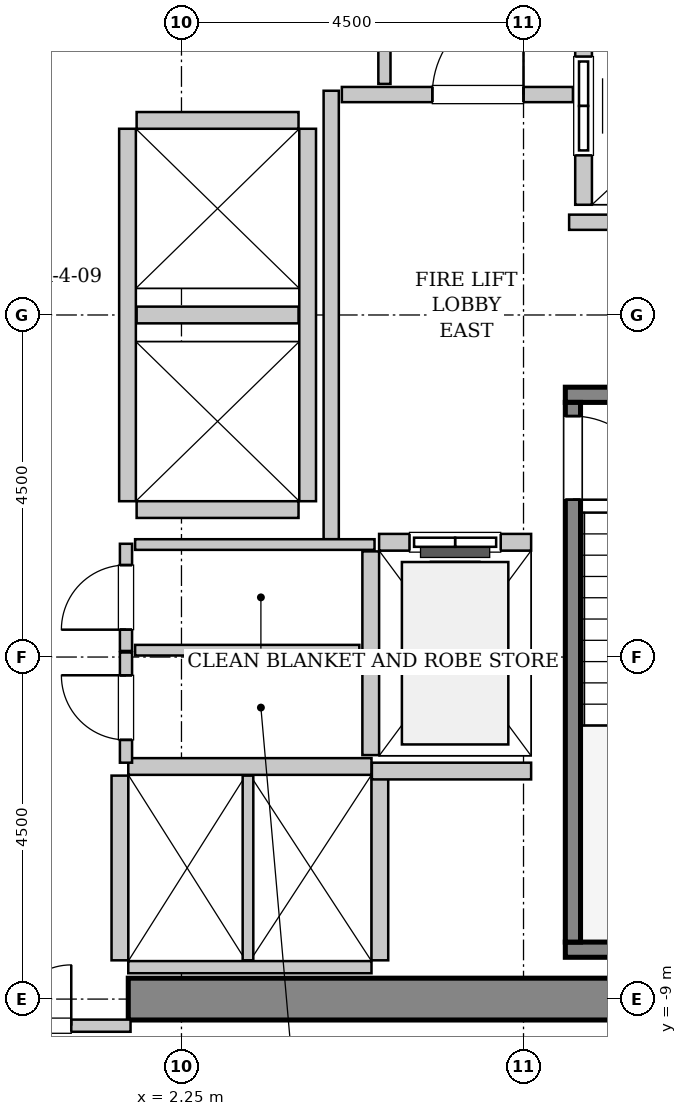
"""IFC4 building model, lengths in metres.
Left out: names, types, materials, properties, quantities, classifications, styles, units other than length and angle.
Written with IfcOpenShell. Run it as: python <this file> out.ifc"""

import sys

from ifc_helpers import new_model, si_unit, direction, frame, frame_2d, origin, place, context, subcontext, project, spatial, rectangle, extrude, source, transform, mapped, element, fill, save


model = new_model("IFC4")
c1 = context("Model", 3, precision=1e-05, world=origin(), true_north=direction((0.0, 1.0)))
c2 = subcontext(c1, "Body", "Model", "MODEL_VIEW")
j1 = project(units=[si_unit("LENGTHUNIT", "METRE"), si_unit("PLANEANGLEUNIT", "RADIAN")], contexts=[c1])
p1 = place(None, origin())
s1 = spatial("IfcSite", under=j1, at=p1, CompositionType="ELEMENT")
p2 = place(p1, origin())
s2 = spatial("IfcBuilding", under=s1, at=p2, CompositionType="ELEMENT")
p3 = place(p2, frame((0.0, 0.0, 90.8)))
s3 = spatial("IfcBuildingStorey", under=s2, at=p3, CompositionType="ELEMENT", Elevation=90.8)
m1 = source(origin(), c2, "Body", "SweptSolid", [
    extrude(rectangle(XDim=9.975, YDim=0.55, at=frame_2d((4.987, 0.0))), origin(), (0.0, 0.0, 1.0), 3.8),
])
p4 = place(p3, frame((1.55, -9.0, 0.0), z_axis=(0.0, 0.0, 1.0), x_axis=(1.0, 0.0, 0.0)))
e1 = element("IfcWall", 1, at=p4, inside=s3, PredefinedType="SHEAR", context=c2, shape_type="MappedRepresentation", body=[
    mapped(m1, transform((0.0, 0.0, 0.0), x_axis=(1.0, 0.0, 0.0), y_axis=(0.0, 1.0, 0.0), z_axis=(0.0, 0.0, 1.0), scale=1.0)),
])
m2 = source(origin(), c2, "Body", "SweptSolid", [
    extrude(rectangle(XDim=3.4, YDim=0.2, at=frame_2d((1.7, 0.0))), origin(), (0.0, 0.0, 1.0), 3.8),
])
p5 = place(p3, frame((7.3, -1.05, 0.0), z_axis=(0.0, 0.0, 1.0), x_axis=(1.0, 0.0, 0.0)))
e2 = element("IfcWall", 2, at=p5, inside=s3, PredefinedType="SOLIDWALL", context=c2, shape_type="MappedRepresentation", body=[
    mapped(m2, transform((0.0, 0.0, 0.0), x_axis=(1.0, 0.0, 0.0), y_axis=(0.0, 1.0, 0.0), z_axis=(0.0, 0.0, 1.0), scale=1.0)),
])
m3 = source(origin(), c2, "Body", "SweptSolid", [
    extrude(rectangle(XDim=3.68, YDim=0.2, at=frame_2d((1.84, 0.0))), origin(), (0.0, 0.0, 1.0), 3.8),
])
p6 = place(p3, frame((7.3, -8.35, 0.0), z_axis=(0.0, 0.0, 1.0), x_axis=(1.0, 0.0, 0.0)))
e3 = element("IfcWall", 3, at=p6, inside=s3, PredefinedType="SOLIDWALL", context=c2, shape_type="MappedRepresentation", body=[
    mapped(m3, transform((0.0, 0.0, 0.0), x_axis=(1.0, 0.0, 0.0), y_axis=(0.0, 1.0, 0.0), z_axis=(0.0, 0.0, 1.0), scale=1.0)),
])
m4 = source(origin(), c2, "Body", "SweptSolid", [
    extrude(rectangle(XDim=7.1, YDim=0.2, at=frame_2d((3.55, 0.0))), origin(), (0.0, 0.0, 1.0), 3.8),
])
p7 = place(p3, frame((7.4, -1.15, 0.0), z_axis=(0.0, 0.0, 1.0), x_axis=(0.0, -1.0, 0.0)))
e4 = element("IfcWall", 4, at=p7, inside=s3, PredefinedType="SOLIDWALL", context=c2, shape_type="MappedRepresentation", body=[
    mapped(m4, transform((0.0, 0.0, 0.0), x_axis=(1.0, 0.0, 0.0), y_axis=(0.0, 1.0, 0.0), z_axis=(0.0, 0.0, 1.0), scale=1.0)),
])
p8 = place(p7, frame((0.18, 0.0, 0.0)))
e5 = element("IfcOpeningElement", 5, at=p8, cuts=e4, PredefinedType="OPENING", context=c2, shape_type="SweptSolid", body=[
    extrude(rectangle(XDim=1.1, YDim=2.15, at=frame_2d((0.55, 1.075))), frame((0.0, 0.11, 0.0), z_axis=(0.0, -1.0, 0.0), x_axis=(1.0, 0.0, 0.0)), (0.0, 0.0, 1.0), 0.22),
])
m5 = source(origin(), c2, "Body", "SweptSolid", [
    extrude(rectangle(XDim=2.0, YDim=0.22, at=frame_2d((1.0, 0.0))), origin(), (0.0, 0.0, 1.0), 3.535),
])
p9 = place(p3, frame((6.85, -2.99, 0.0), z_axis=(0.0, 0.0, 1.0), x_axis=(-1.0, 0.0, 0.0)))
e6 = element("IfcWall", 6, at=p9, inside=s3, PredefinedType="SOLIDWALL", context=c2, shape_type="MappedRepresentation", body=[
    mapped(m5, transform((0.0, 0.0, 0.0), x_axis=(1.0, 0.0, 0.0), y_axis=(0.0, 1.0, 0.0), z_axis=(0.0, 0.0, 1.0), scale=1.0)),
])
p10 = place(p9, frame((0.4, 0.0, 0.0)))
e7 = element("IfcOpeningElement", 7, at=p10, cuts=e6, PredefinedType="OPENING", context=c2, shape_type="SweptSolid", body=[
    extrude(rectangle(XDim=1.2, YDim=2.2, at=frame_2d((0.6, 1.1))), frame((0.0, 0.12, 0.0), z_axis=(0.0, -1.0, 0.0), x_axis=(1.0, 0.0, 0.0)), (0.0, 0.0, 1.0), 0.24),
])
m6 = source(origin(), c2, "Body", "SweptSolid", [
    extrude(rectangle(XDim=2.68, YDim=0.22, at=frame_2d((1.34, 0.0))), origin(), (0.0, 0.0, 1.0), 3.535),
])
p11 = place(p3, frame((4.74, -3.11, 0.0), z_axis=(0.0, 0.0, 1.0), x_axis=(0.0, -1.0, 0.0)))
e8 = element("IfcWall", 8, at=p11, inside=s3, PredefinedType="SOLIDWALL", context=c2, shape_type="MappedRepresentation", body=[
    mapped(m6, transform((0.0, 0.0, 0.0), x_axis=(1.0, 0.0, 0.0), y_axis=(0.0, 1.0, 0.0), z_axis=(0.0, 0.0, 1.0), scale=1.0)),
])
m7 = source(origin(), c2, "Body", "SweptSolid", [
    extrude(rectangle(XDim=5.45, YDim=0.22, at=frame_2d((2.725, 0.0))), origin(), (0.0, 0.0, 1.0), 3.535),
])
p12 = place(p3, frame((7.54, 6.9, 0.0), z_axis=(0.0, 0.0, 1.0), x_axis=(0.0, -1.0, 0.0)))
e9 = element("IfcWall", 9, at=p12, inside=s3, PredefinedType="SOLIDWALL", context=c2, shape_type="MappedRepresentation", body=[
    mapped(m7, transform((0.0, 0.0, 0.0), x_axis=(1.0, 0.0, 0.0), y_axis=(0.0, 1.0, 0.0), z_axis=(0.0, 0.0, 1.0), scale=1.0)),
])
p13 = place(p12, frame((3.5, 0.0, 0.0)))
e10 = element("IfcOpeningElement", 10, at=p13, cuts=e9, PredefinedType="OPENING", context=c2, shape_type="SweptSolid", body=[
    extrude(rectangle(XDim=1.3, YDim=2.3, at=frame_2d((0.65, 1.15))), frame((0.0, 0.12, 0.0), z_axis=(0.0, -1.0, 0.0), x_axis=(1.0, 0.0, 0.0)), (0.0, 0.0, 1.0), 0.24),
])
p14 = place(p12, frame((0.65, 0.0, 0.0)))
e11 = element("IfcOpeningElement", 11, at=p14, cuts=e9, PredefinedType="OPENING", context=c2, shape_type="SweptSolid", body=[
    extrude(rectangle(XDim=1.3, YDim=2.3, at=frame_2d((0.65, 1.15))), frame((0.0, 0.12, 0.0), z_axis=(0.0, -1.0, 0.0), x_axis=(1.0, 0.0, 0.0)), (0.0, 0.0, 1.0), 0.24),
])
m8 = source(origin(), c2, "Body", "SweptSolid", [
    extrude(rectangle(XDim=3.2, YDim=0.22, at=frame_2d((1.6, 0.0))), origin(), (0.0, 0.0, 1.0), 3.535),
])
p15 = place(p3, frame((4.75, -5.94, 0.0), z_axis=(0.0, 0.0, 1.0), x_axis=(-1.0, 0.0, 0.0)))
e12 = element("IfcWall", 12, at=p15, inside=s3, PredefinedType="SOLIDWALL", context=c2, shape_type="MappedRepresentation", body=[
    mapped(m8, transform((0.0, 0.0, 0.0), x_axis=(1.0, 0.0, 0.0), y_axis=(0.0, 1.0, 0.0), z_axis=(0.0, 0.0, 1.0), scale=1.0)),
])
m9 = source(origin(), c2, "Body", "SweptSolid", [
    extrude(rectangle(XDim=3.2, YDim=0.16, at=frame_2d((1.6, 0.0))), origin(), (0.0, 0.0, 1.0), 2.425),
])
p16 = place(p3, frame((1.55, -8.58, 0.0), z_axis=(0.0, 0.0, 1.0), x_axis=(1.0, 0.0, 0.0)))
e13 = element("IfcWall", 13, at=p16, inside=s3, PredefinedType="PARTITIONING", context=c2, shape_type="MappedRepresentation", body=[
    mapped(m9, transform((0.0, 0.0, 0.0), x_axis=(1.0, 0.0, 0.0), y_axis=(0.0, 1.0, 0.0), z_axis=(0.0, 0.0, 1.0), scale=1.0)),
])
m10 = source(origin(), c2, "Body", "SweptSolid", [
    extrude(rectangle(XDim=2.43, YDim=0.22, at=frame_2d((1.215, 0.0))), origin(), (0.0, 0.0, 1.0), 3.535),
])
p17 = place(p3, frame((1.44, -6.06, 0.0), z_axis=(0.0, 0.0, 1.0), x_axis=(0.0, -1.0, 0.0)))
e14 = element("IfcWall", 14, at=p17, inside=s3, PredefinedType="SOLIDWALL", context=c2, shape_type="MappedRepresentation", body=[
    mapped(m10, transform((0.0, 0.0, 0.0), x_axis=(1.0, 0.0, 0.0), y_axis=(0.0, 1.0, 0.0), z_axis=(0.0, 0.0, 1.0), scale=1.0)),
])
m11 = source(origin(), c2, "Body", "SweptSolid", [
    extrude(rectangle(XDim=2.43, YDim=0.14, at=frame_2d((1.215, 0.0))), origin(), (0.0, 0.0, 1.0), 3.535),
])
p18 = place(p3, frame((3.125, -8.49, 0.0), z_axis=(0.0, 0.0, 1.0), x_axis=(0.0, 1.0, 0.0)))
e15 = element("IfcWall", 15, at=p18, inside=s3, PredefinedType="PARTITIONING", context=c2, shape_type="MappedRepresentation", body=[
    mapped(m11, transform((0.0, 0.0, 0.0), x_axis=(1.0, 0.0, 0.0), y_axis=(0.0, 1.0, 0.0), z_axis=(0.0, 0.0, 1.0), scale=1.0)),
])
p19 = place(p3, frame((4.86, -8.49, 0.0), z_axis=(0.0, 0.0, 1.0), x_axis=(0.0, 1.0, 0.0)))
e16 = element("IfcWall", 16, at=p19, inside=s3, PredefinedType="SOLIDWALL", context=c2, shape_type="MappedRepresentation", body=[
    mapped(m10, transform((0.0, 0.0, 0.0), x_axis=(1.0, 0.0, 0.0), y_axis=(0.0, 1.0, 0.0), z_axis=(0.0, 0.0, 1.0), scale=1.0)),
])
m12 = source(origin(), c2, "Body", "SweptSolid", [
    extrude(rectangle(XDim=4.9, YDim=0.22, at=frame_2d((2.45, 0.0))), origin(), (0.0, 0.0, 1.0), 3.535),
])
for number, where, z_axis, x_axis in (
    (17, (1.54, 2.45, 0.0), (0.0, 0.0, 1.0), (0.0, -1.0, 0.0)),
    (18, (3.91, -2.45, 0.0), (0.0, 0.0, 1.0), (0.0, 1.0, 0.0)),
):
    element("IfcWall", number, at=place(p3, frame(where, z_axis=z_axis, x_axis=x_axis)), inside=s3, PredefinedType="SOLIDWALL", context=c2, shape_type="MappedRepresentation", body=[
        mapped(m12, transform((0.0, 0.0, 0.0), x_axis=(1.0, 0.0, 0.0), y_axis=(0.0, 1.0, 0.0), z_axis=(0.0, 0.0, 1.0), scale=1.0)),
    ])
m13 = source(origin(), c2, "Body", "SweptSolid", [
    extrude(rectangle(XDim=2.13, YDim=0.22, at=frame_2d((1.065, 0.0))), origin(), (0.0, 0.0, 1.0), 3.535),
])
for number, where, z_axis, x_axis in (
    (19, (1.66, -2.56, 0.0), (0.0, 0.0, 1.0), (1.0, 0.0, 0.0)),
    (20, (1.66, 0.0, 0.0), (0.0, 0.0, 1.0), (1.0, 0.0, 0.0)),
    (21, (3.79, 2.56, 0.0), (0.0, 0.0, 1.0), (-1.0, 0.0, 0.0)),
):
    element("IfcWall", number, at=place(p3, frame(where, z_axis=z_axis, x_axis=x_axis)), inside=s3, PredefinedType="SOLIDWALL", context=c2, shape_type="MappedRepresentation", body=[
        mapped(m13, transform((0.0, 0.0, 0.0), x_axis=(1.0, 0.0, 0.0), y_axis=(0.0, 1.0, 0.0), z_axis=(0.0, 0.0, 1.0), scale=1.0)),
    ])
m14 = source(origin(), c2, "Body", "SweptSolid", [
    extrude(rectangle(XDim=2.095, YDim=0.22, at=frame_2d((1.048, 0.0))), origin(), (0.0, 0.0, 1.0), 3.535),
])
p20 = place(p3, frame((4.755, -6.0, 0.0), z_axis=(0.0, 0.0, 1.0), x_axis=(1.0, 0.0, 0.0)))
e22 = element("IfcWall", 22, at=p20, inside=s3, PredefinedType="SOLIDWALL", context=c2, shape_type="MappedRepresentation", body=[
    mapped(m14, transform((0.0, 0.0, 0.0), x_axis=(1.0, 0.0, 0.0), y_axis=(0.0, 1.0, 0.0), z_axis=(0.0, 0.0, 1.0), scale=1.0)),
])
m15 = source(origin(), c2, "Body", "SweptSolid", [
    extrude(rectangle(XDim=5.9, YDim=0.2, at=frame_2d((2.95, 0.0))), origin(), (0.0, 0.0, 1.0), 3.535),
])
p21 = place(p3, frame((4.22, -2.95, 0.0), z_axis=(0.0, 0.0, 1.0), x_axis=(0.0, 1.0, 0.0)))
e23 = element("IfcWall", 23, at=p21, inside=s3, PredefinedType="PARTITIONING", context=c2, shape_type="MappedRepresentation", body=[
    mapped(m15, transform((0.0, 0.0, 0.0), x_axis=(1.0, 0.0, 0.0), y_axis=(0.0, 1.0, 0.0), z_axis=(0.0, 0.0, 1.0), scale=1.0)),
])
m16 = source(origin(), c2, "Body", "SweptSolid", [
    extrude(rectangle(XDim=3.04, YDim=0.2, at=frame_2d((1.52, 0.0))), origin(), (0.0, 0.0, 1.0), 3.535),
])
p22 = place(p3, frame((4.36, 2.9, 0.0), z_axis=(0.0, 0.0, 1.0), x_axis=(1.0, 0.0, 0.0)))
e24 = element("IfcWall", 24, at=p22, inside=s3, PredefinedType="PARTITIONING", context=c2, shape_type="MappedRepresentation", body=[
    mapped(m16, transform((0.0, 0.0, 0.0), x_axis=(1.0, 0.0, 0.0), y_axis=(0.0, 1.0, 0.0), z_axis=(0.0, 0.0, 1.0), scale=1.0)),
])
p23 = place(p22, frame((1.19, 0.0, 0.0)))
e25 = element("IfcOpeningElement", 25, at=p23, cuts=e24, PredefinedType="OPENING", context=c2, shape_type="SweptSolid", body=[
    extrude(rectangle(XDim=1.2, YDim=2.15, at=frame_2d((0.6, 1.075))), frame((0.0, 0.11, 0.0), z_axis=(0.0, -1.0, 0.0), x_axis=(1.0, 0.0, 0.0)), (0.0, 0.0, 1.0), 0.22),
])
m17 = source(origin(), c2, "Body", "SweptSolid", [
    extrude(rectangle(XDim=4.11, YDim=0.2, at=frame_2d((2.055, 0.0))), origin(), (0.0, 0.0, 1.0), 3.535),
])
p24 = place(p3, frame((7.35, 1.22, 0.0), z_axis=(0.0, 0.0, 1.0), x_axis=(1.0, 0.0, 0.0)))
e26 = element("IfcWall", 26, at=p24, inside=s3, PredefinedType="PARTITIONING", context=c2, shape_type="MappedRepresentation", body=[
    mapped(m17, transform((0.0, 0.0, 0.0), x_axis=(1.0, 0.0, 0.0), y_axis=(0.0, 1.0, 0.0), z_axis=(0.0, 0.0, 1.0), scale=1.0)),
])
m18 = source(origin(), c2, "Body", "SweptSolid", [
    extrude(rectangle(XDim=3.16, YDim=0.16, at=frame_2d((1.58, 0.0))), origin(), (0.0, 0.0, 1.0), 2.425),
])
p25 = place(p3, frame((-1.58, -9.35, 0.0), z_axis=(0.0, 0.0, 1.0), x_axis=(1.0, 0.0, 0.0)))
e27 = element("IfcWall", 27, at=p25, inside=s3, PredefinedType="PARTITIONING", context=c2, shape_type="MappedRepresentation", body=[
    mapped(m18, transform((0.0, 0.0, 0.0), x_axis=(1.0, 0.0, 0.0), y_axis=(0.0, 1.0, 0.0), z_axis=(0.0, 0.0, 1.0), scale=1.0)),
])
p26 = place(p25, frame((0.78, 0.0, 0.0)))
e28 = element("IfcOpeningElement", 28, at=p26, cuts=e27, PredefinedType="OPENING", context=c2, shape_type="SweptSolid", body=[
    extrude(rectangle(XDim=1.6, YDim=2.3, at=frame_2d((0.8, 1.15))), frame((0.0, 0.09, 0.0), z_axis=(0.0, -1.0, 0.0), x_axis=(1.0, 0.0, 0.0)), (0.0, 0.0, 1.0), 0.18),
])
m19 = source(origin(), c2, "Body", "SweptSolid", [
    extrude(rectangle(XDim=3.015, YDim=0.16, at=frame_2d((1.507, 0.0))), origin(), (0.0, 0.0, 1.0), 3.535),
])
p27 = place(p3, frame((4.92, 3.04, 0.0), z_axis=(0.0, 0.0, 1.0), x_axis=(0.0, 1.0, 0.0)))
e29 = element("IfcWall", 29, at=p27, inside=s3, PredefinedType="PARTITIONING", context=c2, shape_type="MappedRepresentation", body=[
    mapped(m19, transform((0.0, 0.0, 0.0), x_axis=(1.0, 0.0, 0.0), y_axis=(0.0, 1.0, 0.0), z_axis=(0.0, 0.0, 1.0), scale=1.0)),
])
m20 = source(origin(), c2, "Body", "SweptSolid", [
    extrude(rectangle(XDim=1.41, YDim=0.16, at=frame_2d((0.705, 0.0))), origin(), (0.0, 0.0, 1.0), 3.535),
])
p28 = place(p3, frame((1.52, -4.42, 0.0), z_axis=(0.0, 0.0, 1.0), x_axis=(0.0, 1.0, 0.0)))
e30 = element("IfcWall", 30, at=p28, inside=s3, PredefinedType="PARTITIONING", context=c2, shape_type="MappedRepresentation", body=[
    mapped(m20, transform((0.0, 0.0, 0.0), x_axis=(1.0, 0.0, 0.0), y_axis=(0.0, 1.0, 0.0), z_axis=(0.0, 0.0, 1.0), scale=1.0)),
])
p29 = place(p28, frame((0.28, 0.0, 0.0)))
e31 = element("IfcOpeningElement", 31, at=p29, cuts=e30, PredefinedType="OPENING", context=c2, shape_type="SweptSolid", body=[
    extrude(rectangle(XDim=0.85, YDim=2.1, at=frame_2d((0.425, 1.05))), frame((0.0, 0.09, 0.0), z_axis=(0.0, -1.0, 0.0), x_axis=(1.0, 0.0, 0.0)), (0.0, 0.0, 1.0), 0.18),
])
m21 = source(origin(), c2, "Body", "SweptSolid", [
    extrude(rectangle(XDim=3.15, YDim=0.14, at=frame_2d((1.575, 0.0))), origin(), (0.0, 0.0, 1.0), 3.535),
])
p30 = place(p3, frame((1.64, -3.02, 0.0), z_axis=(0.0, 0.0, 1.0), x_axis=(1.0, 0.0, 0.0)))
e32 = element("IfcWall", 32, at=p30, inside=s3, PredefinedType="PARTITIONING", context=c2, shape_type="MappedRepresentation", body=[
    mapped(m21, transform((0.0, 0.0, 0.0), x_axis=(1.0, 0.0, 0.0), y_axis=(0.0, 1.0, 0.0), z_axis=(0.0, 0.0, 1.0), scale=1.0)),
])
m22 = source(origin(), c2, "Body", "SweptSolid", [
    extrude(rectangle(XDim=2.95, YDim=0.14, at=frame_2d((1.475, 0.0))), origin(), (0.0, 0.0, 1.0), 3.535),
])
p31 = place(p3, frame((1.64, -4.41, 0.0), z_axis=(0.0, 0.0, 1.0), x_axis=(1.0, 0.0, 0.0)))
e33 = element("IfcWall", 33, at=p31, inside=s3, PredefinedType="PARTITIONING", context=c2, shape_type="MappedRepresentation", body=[
    mapped(m22, transform((0.0, 0.0, 0.0), x_axis=(1.0, 0.0, 0.0), y_axis=(0.0, 1.0, 0.0), z_axis=(0.0, 0.0, 1.0), scale=1.0)),
])
m23 = source(origin(), c2, "Body", "SweptSolid", [
    extrude(rectangle(XDim=1.45, YDim=0.16, at=frame_2d((0.725, 0.0))), origin(), (0.0, 0.0, 1.0), 3.535),
])
p32 = place(p3, frame((1.52, -5.89, 0.0), z_axis=(0.0, 0.0, 1.0), x_axis=(0.0, 1.0, 0.0)))
e34 = element("IfcWall", 34, at=p32, inside=s3, PredefinedType="PARTITIONING", context=c2, shape_type="MappedRepresentation", body=[
    mapped(m23, transform((0.0, 0.0, 0.0), x_axis=(1.0, 0.0, 0.0), y_axis=(0.0, 1.0, 0.0), z_axis=(0.0, 0.0, 1.0), scale=1.0)),
])
p33 = place(p32, frame((0.3, 0.0, 0.0)))
e35 = element("IfcOpeningElement", 35, at=p33, cuts=e34, PredefinedType="OPENING", context=c2, shape_type="SweptSolid", body=[
    extrude(rectangle(XDim=0.85, YDim=2.1, at=frame_2d((0.425, 1.05))), frame((0.0, 0.09, 0.0), z_axis=(0.0, -1.0, 0.0), x_axis=(1.0, 0.0, 0.0)), (0.0, 0.0, 1.0), 0.18),
])
m24 = source(origin(), c2, "Body", "SweptSolid", [
    extrude(rectangle(XDim=1.1, YDim=2.15, at=frame_2d((0.55, 1.075))), frame((0.0, 0.025, 0.0), z_axis=(0.0, -1.0, 0.0), x_axis=(1.0, 0.0, 0.0)), (0.0, 0.0, 1.0), 0.05),
])
p34 = place(p8, origin())
e36 = element("IfcDoor", 36, at=p34, inside=s3, OperationType="SINGLE_SWING_RIGHT", PredefinedType="DOOR", context=c2, shape_type="MappedRepresentation", body=[
    mapped(m24, transform((0.0, 0.0, 0.0), x_axis=(1.0, 0.0, 0.0), y_axis=(0.0, 1.0, 0.0), z_axis=(0.0, 0.0, 1.0), scale=1.0)),
])
fill(e5, e36)
m25 = source(origin(), c2, "Body", "SweptSolid", [
    extrude(rectangle(XDim=1.2, YDim=2.2, at=frame_2d((0.6, 1.1))), frame((0.0, 0.025, 0.0), z_axis=(0.0, -1.0, 0.0), x_axis=(1.0, 0.0, 0.0)), (0.0, 0.0, 1.0), 0.05),
])
p35 = place(p10, origin())
e37 = element("IfcDoor", 37, at=p35, inside=s3, OperationType="SLIDING_TO_LEFT", PredefinedType="DOOR", context=c2, shape_type="MappedRepresentation", body=[
    mapped(m25, transform((0.0, 0.0, 0.0), x_axis=(1.0, 0.0, 0.0), y_axis=(0.0, 1.0, 0.0), z_axis=(0.0, 0.0, 1.0), scale=1.0)),
])
fill(e7, e37)
m26 = source(origin(), c2, "Body", "SweptSolid", [
    extrude(rectangle(XDim=1.3, YDim=2.3, at=frame_2d((0.65, 1.15))), frame((0.0, 0.025, 0.0), z_axis=(0.0, -1.0, 0.0), x_axis=(1.0, 0.0, 0.0)), (0.0, 0.0, 1.0), 0.05),
])
p36 = place(p13, origin())
e38 = element("IfcDoor", 38, at=p36, inside=s3, OperationType="SLIDING_TO_RIGHT", PredefinedType="DOOR", context=c2, shape_type="MappedRepresentation", body=[
    mapped(m26, transform((0.0, 0.0, 0.0), x_axis=(1.0, 0.0, 0.0), y_axis=(0.0, 1.0, 0.0), z_axis=(0.0, 0.0, 1.0), scale=1.0)),
])
fill(e10, e38)
m27 = source(origin(), c2, "Body", "SweptSolid", [
    extrude(rectangle(XDim=1.2, YDim=2.15, at=frame_2d((0.6, 1.075))), frame((0.0, 0.025, 0.0), z_axis=(0.0, -1.0, 0.0), x_axis=(1.0, 0.0, 0.0)), (0.0, 0.0, 1.0), 0.05),
])
p37 = place(p23, origin())
e39 = element("IfcDoor", 39, at=p37, inside=s3, OperationType="SINGLE_SWING_RIGHT", PredefinedType="DOOR", context=c2, shape_type="MappedRepresentation", body=[
    mapped(m27, transform((0.0, 0.0, 0.0), x_axis=(1.0, 0.0, 0.0), y_axis=(0.0, 1.0, 0.0), z_axis=(0.0, 0.0, 1.0), scale=1.0)),
])
fill(e25, e39)
m28 = source(origin(), c2, "Body", "SweptSolid", [
    extrude(rectangle(XDim=1.6, YDim=2.3, at=frame_2d((0.8, 1.15))), frame((0.0, 0.025, 0.0), z_axis=(0.0, -1.0, 0.0), x_axis=(1.0, 0.0, 0.0)), (0.0, 0.0, 1.0), 0.05),
])
p38 = place(p26, origin())
e40 = element("IfcDoor", 40, at=p38, inside=s3, OperationType="DOUBLE_DOOR_SINGLE_SWING", PredefinedType="DOOR", context=c2, shape_type="MappedRepresentation", body=[
    mapped(m28, transform((0.0, 0.0, 0.0), x_axis=(1.0, 0.0, 0.0), y_axis=(0.0, 1.0, 0.0), z_axis=(0.0, 0.0, 1.0), scale=1.0)),
])
fill(e28, e40)
m29 = source(origin(), c2, "Body", "SweptSolid", [
    extrude(rectangle(XDim=0.85, YDim=2.1, at=frame_2d((0.425, 1.05))), frame((0.0, 0.025, 0.0), z_axis=(0.0, -1.0, 0.0), x_axis=(1.0, 0.0, 0.0)), (0.0, 0.0, 1.0), 0.05),
])
p39 = place(p29, origin())
e41 = element("IfcDoor", 41, at=p39, inside=s3, OperationType="SINGLE_SWING_LEFT", PredefinedType="DOOR", context=c2, shape_type="MappedRepresentation", body=[
    mapped(m29, transform((0.0, 0.0, 0.0), x_axis=(1.0, 0.0, 0.0), y_axis=(0.0, 1.0, 0.0), z_axis=(0.0, 0.0, 1.0), scale=1.0)),
])
fill(e31, e41)
p40 = place(p33, origin())
e42 = element("IfcDoor", 42, at=p40, inside=s3, OperationType="SINGLE_SWING_RIGHT", PredefinedType="DOOR", context=c2, shape_type="MappedRepresentation", body=[
    mapped(m29, transform((0.0, 0.0, 0.0), x_axis=(1.0, 0.0, 0.0), y_axis=(0.0, 1.0, 0.0), z_axis=(0.0, 0.0, 1.0), scale=1.0)),
])
fill(e35, e42)
save(model, sys.argv[1])
